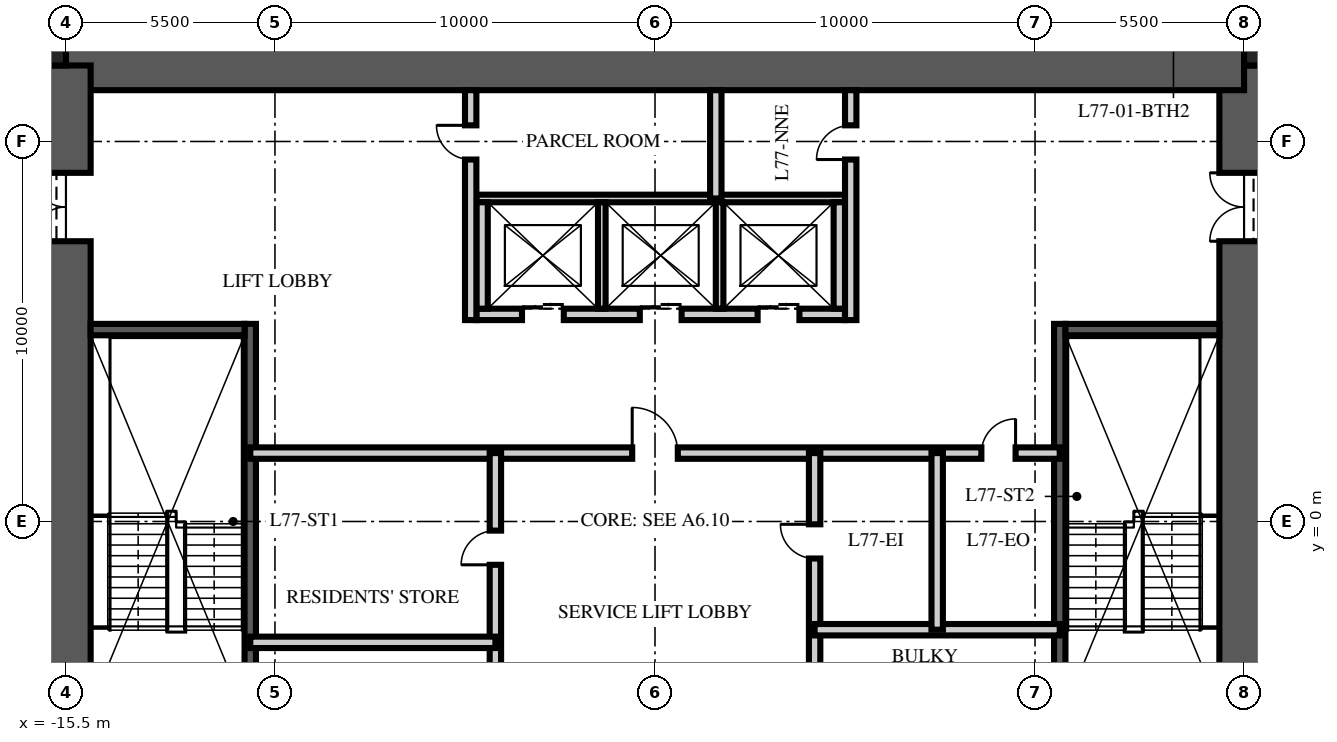
"""IFC4 building model, lengths in metres.
Left out: names, types, materials, properties, quantities, classifications, styles, units other than length and angle.
Written with IfcOpenShell. Run it as: python <this file> out.ifc"""

import sys

from ifc_helpers import new_model, si_unit, direction, frame, frame_2d, origin, origin_2d, place, context, subcontext, project, spatial, rectangle, extrude, element, fill, save


model = new_model("IFC4")
c1 = context("Model", 3, precision=1e-05, world=origin(), true_north=direction((0.0, 1.0)))
c2 = subcontext(c1, "Body", "Model", "MODEL_VIEW")
j1 = project(units=[si_unit("LENGTHUNIT", "METRE"), si_unit("PLANEANGLEUNIT", "RADIAN")], contexts=[c1])
p1 = place(None, origin())
s1 = spatial("IfcSite", under=j1, at=p1, CompositionType="ELEMENT")
p2 = place(p1, origin())
s2 = spatial("IfcBuilding", under=s1, at=p2, CompositionType="ELEMENT")
p3 = place(p2, frame((0.0, 0.0, 308.25)))
s3 = spatial("IfcBuildingStorey", under=s2, at=p3, CompositionType="ELEMENT", Elevation=308.25)
p4 = place(p3, frame((15.5, -12.0, -0.25), z_axis=(0.0, 0.0, 1.0), x_axis=(0.0, 1.0, 0.0)))
e1 = element("IfcWall", 1, at=p4, inside=s3, PredefinedType="SHEAR", context=c2, shape_type="SweptSolid", body=[
    extrude(rectangle(XDim=24.0, YDim=1.3, at=frame_2d((12.0, 0.0))), origin(), (0.0, 0.0, 1.0), 3.75),
])
p5 = place(p4, frame((3.125, 0.0, 0.25)))
e2 = element("IfcOpeningElement", 2, at=p5, cuts=e1, PredefinedType="OPENING", context=c2, shape_type="SweptSolid", body=[
    extrude(rectangle(XDim=1.2, YDim=2.1, at=frame_2d((0.6, 1.05))), frame((0.0, 0.66, 0.0), z_axis=(0.0, -1.0, 0.0), x_axis=(1.0, 0.0, 0.0)), (0.0, 0.0, 1.0), 1.32),
])
p6 = place(p4, frame((19.375, 0.0, 0.25)))
e3 = element("IfcOpeningElement", 3, at=p6, cuts=e1, PredefinedType="OPENING", context=c2, shape_type="SweptSolid", body=[
    extrude(rectangle(XDim=1.8, YDim=2.1, at=frame_2d((0.9, 1.05))), frame((0.0, 0.66, 0.0), z_axis=(0.0, -1.0, 0.0), x_axis=(1.0, 0.0, 0.0)), (0.0, 0.0, 1.0), 1.32),
])
p7 = place(p3, frame((-15.5, 12.0, -0.25), z_axis=(0.0, 0.0, 1.0), x_axis=(1.0, 0.0, 0.0)))
e4 = element("IfcWall", 4, at=p7, inside=s3, PredefinedType="SHEAR", context=c2, shape_type="SweptSolid", body=[
    extrude(rectangle(XDim=31.0, YDim=1.3, at=frame_2d((15.5, 0.0))), origin(), (0.0, 0.0, 1.0), 3.75),
])
p8 = place(p3, frame((-15.5, -12.0, -0.25), z_axis=(0.0, 0.0, 1.0), x_axis=(0.0, 1.0, 0.0)))
e5 = element("IfcWall", 5, at=p8, inside=s3, PredefinedType="SHEAR", context=c2, shape_type="SweptSolid", body=[
    extrude(rectangle(XDim=24.0, YDim=1.3, at=frame_2d((12.0, 0.0))), origin(), (0.0, 0.0, 1.0), 3.75),
])
p9 = place(p8, frame((3.125, 0.0, 0.25)))
e6 = element("IfcOpeningElement", 6, at=p9, cuts=e5, PredefinedType="OPENING", context=c2, shape_type="SweptSolid", body=[
    extrude(rectangle(XDim=1.2, YDim=2.1, at=frame_2d((0.6, 1.05))), frame((0.0, 0.66, 0.0), z_axis=(0.0, -1.0, 0.0), x_axis=(1.0, 0.0, 0.0)), (0.0, 0.0, 1.0), 1.32),
])
p10 = place(p8, frame((19.375, 0.0, 0.25)))
e7 = element("IfcOpeningElement", 7, at=p10, cuts=e5, PredefinedType="OPENING", context=c2, shape_type="SweptSolid", body=[
    extrude(rectangle(XDim=1.8, YDim=2.1, at=frame_2d((0.9, 1.05))), frame((0.0, 0.66, 0.0), z_axis=(0.0, -1.0, 0.0), x_axis=(1.0, 0.0, 0.0)), (0.0, 0.0, 1.0), 1.32),
])
for number, where, z_axis, x_axis in (
    (8, (15.825, 12.325, -0.25), (0.0, 0.0, 1.0), (1.0, 0.0, 0.0)),
    (9, (-15.825, 12.325, -0.25), (0.0, 0.0, 1.0), (1.0, 0.0, 0.0)),
):
    element("IfcColumn", number, at=place(p3, frame(where, z_axis=z_axis, x_axis=x_axis)), inside=s3, PredefinedType="COLUMN", context=c2, shape_type="SweptSolid", body=[
        extrude(rectangle(XDim=0.65, YDim=0.65, at=origin_2d()), origin(), (0.0, 0.0, 1.0), 3.75),
    ])
p11 = place(p3, frame((-10.65, -4.9, 0.0), z_axis=(0.0, 0.0, 1.0), x_axis=(0.0, 1.0, 0.0)))
e10 = element("IfcWall", 10, at=p11, inside=s3, PredefinedType="SOLIDWALL", context=c2, shape_type="SweptSolid", body=[
    extrude(rectangle(XDim=10.1, YDim=0.3, at=frame_2d((5.05, 0.0))), origin(), (0.0, 0.0, 1.0), 3.5),
])
p12 = place(p3, frame((-14.85, 5.05, 0.0), z_axis=(0.0, 0.0, 1.0), x_axis=(1.0, 0.0, 0.0)))
e11 = element("IfcWall", 11, at=p12, inside=s3, PredefinedType="SOLIDWALL", context=c2, shape_type="SweptSolid", body=[
    extrude(rectangle(XDim=4.05, YDim=0.3, at=frame_2d((2.025, 0.0))), origin(), (0.0, 0.0, 1.0), 3.5),
])
p13 = place(p3, frame((10.65, -4.9, 0.0), z_axis=(0.0, 0.0, 1.0), x_axis=(0.0, 1.0, 0.0)))
e12 = element("IfcWall", 12, at=p13, inside=s3, PredefinedType="SOLIDWALL", context=c2, shape_type="SweptSolid", body=[
    extrude(rectangle(XDim=10.1, YDim=0.3, at=frame_2d((5.05, 0.0))), origin(), (0.0, 0.0, 1.0), 3.5),
])
p14 = place(p3, frame((14.85, 5.05, 0.0), z_axis=(0.0, 0.0, 1.0), x_axis=(-1.0, 0.0, 0.0)))
e13 = element("IfcWall", 13, at=p14, inside=s3, PredefinedType="SOLIDWALL", context=c2, shape_type="SweptSolid", body=[
    extrude(rectangle(XDim=4.05, YDim=0.3, at=frame_2d((2.025, 0.0))), origin(), (0.0, 0.0, 1.0), 3.5),
])
p15 = place(p3, frame((-4.7, 5.45, 0.0), z_axis=(0.0, 0.0, 1.0), x_axis=(1.0, 0.0, 0.0)))
e14 = element("IfcWall", 14, at=p15, inside=s3, PredefinedType="PARTITIONING", context=c2, shape_type="SweptSolid", body=[
    extrude(rectangle(XDim=9.7, YDim=0.3, at=frame_2d((4.85, 0.0))), origin(), (0.0, 0.0, 1.0), 3.5),
])
p16 = place(p15, frame((1.2, 0.0, 0.0)))
e15 = element("IfcOpeningElement", 15, at=p16, cuts=e14, PredefinedType="OPENING", context=c2, shape_type="SweptSolid", body=[
    extrude(rectangle(XDim=1.1, YDim=2.1, at=frame_2d((0.55, 1.05))), frame((0.0, 0.16, 0.0), z_axis=(0.0, -1.0, 0.0), x_axis=(1.0, 0.0, 0.0)), (0.0, 0.0, 1.0), 0.32),
])
p17 = place(p15, frame((4.3, 0.0, 0.0)))
e16 = element("IfcOpeningElement", 16, at=p17, cuts=e14, PredefinedType="OPENING", context=c2, shape_type="SweptSolid", body=[
    extrude(rectangle(XDim=1.1, YDim=2.1, at=frame_2d((0.55, 1.05))), frame((0.0, 0.16, 0.0), z_axis=(0.0, -1.0, 0.0), x_axis=(1.0, 0.0, 0.0)), (0.0, 0.0, 1.0), 0.32),
])
p18 = place(p15, frame((7.4, 0.0, 0.0)))
e17 = element("IfcOpeningElement", 17, at=p18, cuts=e14, PredefinedType="OPENING", context=c2, shape_type="SweptSolid", body=[
    extrude(rectangle(XDim=1.1, YDim=2.1, at=frame_2d((0.55, 1.05))), frame((0.0, 0.16, 0.0), z_axis=(0.0, -1.0, 0.0), x_axis=(1.0, 0.0, 0.0)), (0.0, 0.0, 1.0), 0.32),
])
p19 = place(p3, frame((-4.7, 8.5, 0.0), z_axis=(0.0, 0.0, 1.0), x_axis=(1.0, 0.0, 0.0)))
e18 = element("IfcWall", 18, at=p19, inside=s3, PredefinedType="PARTITIONING", context=c2, shape_type="SweptSolid", body=[
    extrude(rectangle(XDim=9.7, YDim=0.2, at=frame_2d((4.85, 0.0))), origin(), (0.0, 0.0, 1.0), 3.5),
])
for number, where, z_axis, x_axis in (
    (19, (-4.55, 5.6, 0.0), (0.0, 0.0, 1.0), (0.0, 1.0, 0.0)),
    (20, (4.85, 5.6, 0.0), (0.0, 0.0, 1.0), (0.0, 1.0, 0.0)),
):
    element("IfcWall", number, at=place(p3, frame(where, z_axis=z_axis, x_axis=x_axis)), inside=s3, PredefinedType="PARTITIONING", context=c2, shape_type="SweptSolid", body=[
        extrude(rectangle(XDim=2.8, YDim=0.3, at=frame_2d((1.4, 0.0))), origin(), (0.0, 0.0, 1.0), 3.5),
    ])
for number, where, z_axis, x_axis in (
    (21, (-1.4, 5.6, 0.0), (0.0, 0.0, 1.0), (0.0, 1.0, 0.0)),
    (22, (1.7, 5.6, 0.0), (0.0, 0.0, 1.0), (0.0, 1.0, 0.0)),
):
    element("IfcWall", number, at=place(p3, frame(where, z_axis=z_axis, x_axis=x_axis)), inside=s3, PredefinedType="PARTITIONING", context=c2, shape_type="SweptSolid", body=[
        extrude(rectangle(XDim=2.8, YDim=0.2, at=frame_2d((1.4, 0.0))), origin(), (0.0, 0.0, 1.0), 3.5),
    ])
p20 = place(p3, frame((-10.65, 1.8, 0.0), z_axis=(0.0, 0.0, 1.0), x_axis=(1.0, 0.0, 0.0)))
e23 = element("IfcWall", 23, at=p20, inside=s3, PredefinedType="PARTITIONING", context=c2, shape_type="SweptSolid", body=[
    extrude(rectangle(XDim=21.3, YDim=0.3, at=frame_2d((10.65, 0.0))), origin(), (0.0, 0.0, 1.0), 3.5),
])
p21 = place(p20, frame((10.05, 0.0, 0.0)))
e24 = element("IfcOpeningElement", 24, at=p21, cuts=e23, PredefinedType="OPENING", context=c2, shape_type="SweptSolid", body=[
    extrude(rectangle(XDim=1.2, YDim=2.1, at=frame_2d((0.6, 1.05))), frame((0.0, 0.16, 0.0), z_axis=(0.0, -1.0, 0.0), x_axis=(1.0, 0.0, 0.0)), (0.0, 0.0, 1.0), 0.32),
])
p22 = place(p20, frame((19.238, 0.0, 0.0)))
e25 = element("IfcOpeningElement", 25, at=p22, cuts=e23, PredefinedType="OPENING", context=c2, shape_type="SweptSolid", body=[
    extrude(rectangle(XDim=0.9, YDim=2.1, at=frame_2d((0.45, 1.05))), frame((0.0, 0.16, 0.0), z_axis=(0.0, -1.0, 0.0), x_axis=(1.0, 0.0, 0.0)), (0.0, 0.0, 1.0), 0.32),
])
p23 = place(p3, frame((-4.2, -6.65, 0.0), z_axis=(0.0, 0.0, 1.0), x_axis=(0.0, 1.0, 0.0)))
e26 = element("IfcWall", 26, at=p23, inside=s3, PredefinedType="PARTITIONING", context=c2, shape_type="SweptSolid", body=[
    extrude(rectangle(XDim=8.45, YDim=0.3, at=frame_2d((4.225, 0.0))), origin(), (0.0, 0.0, 1.0), 3.5),
])
p24 = place(p23, frame((1.285, 0.0, 0.0)))
e27 = element("IfcOpeningElement", 27, at=p24, cuts=e26, PredefinedType="OPENING", context=c2, shape_type="SweptSolid", body=[
    extrude(rectangle(XDim=0.9, YDim=2.1, at=frame_2d((0.45, 1.05))), frame((0.0, 0.16, 0.0), z_axis=(0.0, -1.0, 0.0), x_axis=(1.0, 0.0, 0.0)), (0.0, 0.0, 1.0), 0.32),
])
p25 = place(p23, frame((5.51, 0.0, 0.0)))
e28 = element("IfcOpeningElement", 28, at=p25, cuts=e26, PredefinedType="OPENING", context=c2, shape_type="SweptSolid", body=[
    extrude(rectangle(XDim=0.9, YDim=2.1, at=frame_2d((0.45, 1.05))), frame((0.0, 0.16, 0.0), z_axis=(0.0, -1.0, 0.0), x_axis=(1.0, 0.0, 0.0)), (0.0, 0.0, 1.0), 0.32),
])
p26 = place(p3, frame((4.2, -6.65, 0.0), z_axis=(0.0, 0.0, 1.0), x_axis=(0.0, 1.0, 0.0)))
e29 = element("IfcWall", 29, at=p26, inside=s3, PredefinedType="PARTITIONING", context=c2, shape_type="SweptSolid", body=[
    extrude(rectangle(XDim=8.45, YDim=0.3, at=frame_2d((4.225, 0.0))), origin(), (0.0, 0.0, 1.0), 3.5),
])
p27 = place(p26, frame((1.451, 0.0, 0.0)))
e30 = element("IfcOpeningElement", 30, at=p27, cuts=e29, PredefinedType="OPENING", context=c2, shape_type="SweptSolid", body=[
    extrude(rectangle(XDim=0.9, YDim=2.1, at=frame_2d((0.45, 1.05))), frame((0.0, 0.16, 0.0), z_axis=(0.0, -1.0, 0.0), x_axis=(1.0, 0.0, 0.0)), (0.0, 0.0, 1.0), 0.32),
])
p28 = place(p26, frame((5.676, 0.0, 0.0)))
e31 = element("IfcOpeningElement", 31, at=p28, cuts=e29, PredefinedType="OPENING", context=c2, shape_type="SweptSolid", body=[
    extrude(rectangle(XDim=0.9, YDim=2.1, at=frame_2d((0.45, 1.05))), frame((0.0, 0.16, 0.0), z_axis=(0.0, -1.0, 0.0), x_axis=(1.0, 0.0, 0.0)), (0.0, 0.0, 1.0), 0.32),
])
for number, where, z_axis, x_axis in (
    (32, (-10.65, -3.18, 0.0), (0.0, 0.0, 1.0), (1.0, 0.0, 0.0)),
    (33, (10.65, -2.848, 0.0), (0.0, 0.0, 1.0), (-1.0, 0.0, 0.0)),
):
    element("IfcWall", number, at=place(p3, frame(where, z_axis=z_axis, x_axis=x_axis)), inside=s3, PredefinedType="PARTITIONING", context=c2, shape_type="SweptSolid", body=[
        extrude(rectangle(XDim=6.45, YDim=0.3, at=frame_2d((3.225, 0.0))), origin(), (0.0, 0.0, 1.0), 3.5),
    ])
p29 = place(p3, frame((7.425, -2.848, 0.0), z_axis=(0.0, 0.0, 1.0), x_axis=(0.0, 1.0, 0.0)))
e34 = element("IfcWall", 34, at=p29, inside=s3, PredefinedType="PARTITIONING", context=c2, shape_type="SweptSolid", body=[
    extrude(rectangle(XDim=4.648, YDim=0.3, at=frame_2d((2.324, 0.0))), origin(), (0.0, 0.0, 1.0), 3.5),
])
p30 = place(p3, frame((-4.85, 5.3, 0.0), z_axis=(0.0, 0.0, 1.0), x_axis=(0.0, 1.0, 0.0)))
e35 = element("IfcWall", 35, at=p30, inside=s3, PredefinedType="PARTITIONING", context=c2, shape_type="SweptSolid", body=[
    extrude(rectangle(XDim=6.05, YDim=0.3, at=frame_2d((3.025, 0.0))), origin(), (0.0, 0.0, 1.0), 3.5),
])
p31 = place(p30, frame((4.225, 0.0, 0.0)))
e36 = element("IfcOpeningElement", 36, at=p31, cuts=e35, PredefinedType="OPENING", context=c2, shape_type="SweptSolid", body=[
    extrude(rectangle(XDim=0.9, YDim=2.1, at=frame_2d((0.45, 1.05))), frame((0.0, 0.16, 0.0), z_axis=(0.0, -1.0, 0.0), x_axis=(1.0, 0.0, 0.0)), (0.0, 0.0, 1.0), 0.32),
])
p32 = place(p3, frame((5.15, 5.3, 0.0), z_axis=(0.0, 0.0, 1.0), x_axis=(0.0, 1.0, 0.0)))
e37 = element("IfcWall", 37, at=p32, inside=s3, PredefinedType="PARTITIONING", context=c2, shape_type="SweptSolid", body=[
    extrude(rectangle(XDim=6.05, YDim=0.3, at=frame_2d((3.025, 0.0))), origin(), (0.0, 0.0, 1.0), 3.5),
])
p33 = place(p32, frame((4.225, 0.0, 0.0)))
e38 = element("IfcOpeningElement", 38, at=p33, cuts=e37, PredefinedType="OPENING", context=c2, shape_type="SweptSolid", body=[
    extrude(rectangle(XDim=0.9, YDim=2.1, at=frame_2d((0.45, 1.05))), frame((0.0, 0.16, 0.0), z_axis=(0.0, -1.0, 0.0), x_axis=(1.0, 0.0, 0.0)), (0.0, 0.0, 1.0), 0.32),
])
p34 = place(p3, frame((1.6, 8.5, 0.0), z_axis=(0.0, 0.0, 1.0), x_axis=(0.0, 1.0, 0.0)))
e39 = element("IfcWall", 39, at=p34, inside=s3, PredefinedType="PARTITIONING", context=c2, shape_type="SweptSolid", body=[
    extrude(rectangle(XDim=2.85, YDim=0.3, at=frame_2d((1.425, 0.0))), origin(), (0.0, 0.0, 1.0), 3.5),
])
p35 = place(p10, origin())
e40 = element("IfcDoor", 40, at=p35, inside=s3, OperationType="DOUBLE_DOOR_SINGLE_SWING", PredefinedType="DOOR", context=c2, shape_type="SweptSolid", body=[
    extrude(rectangle(XDim=1.8, YDim=2.1, at=frame_2d((0.9, 1.05))), frame((0.0, 0.025, 0.0), z_axis=(0.0, -1.0, 0.0), x_axis=(1.0, 0.0, 0.0)), (0.0, 0.0, 1.0), 0.05),
])
fill(e7, e40)
p36 = place(p6, origin())
e41 = element("IfcDoor", 41, at=p36, inside=s3, OperationType="DOUBLE_DOOR_SINGLE_SWING", PredefinedType="DOOR", context=c2, shape_type="SweptSolid", body=[
    extrude(rectangle(XDim=1.8, YDim=2.1, at=frame_2d((0.9, 1.05))), frame((0.0, 0.025, 0.0), z_axis=(0.0, -1.0, 0.0), x_axis=(1.0, 0.0, 0.0)), (0.0, 0.0, 1.0), 0.05),
])
fill(e3, e41)
p37 = place(p16, origin())
e42 = element("IfcDoor", 42, at=p37, inside=s3, OperationType="DOUBLE_DOOR_SLIDING", PredefinedType="DOOR", context=c2, shape_type="SweptSolid", body=[
    extrude(rectangle(XDim=1.1, YDim=2.1, at=frame_2d((0.55, 1.05))), frame((0.0, 0.025, 0.0), z_axis=(0.0, -1.0, 0.0), x_axis=(1.0, 0.0, 0.0)), (0.0, 0.0, 1.0), 0.05),
])
fill(e15, e42)
p38 = place(p17, origin())
e43 = element("IfcDoor", 43, at=p38, inside=s3, OperationType="DOUBLE_DOOR_SLIDING", PredefinedType="DOOR", context=c2, shape_type="SweptSolid", body=[
    extrude(rectangle(XDim=1.1, YDim=2.1, at=frame_2d((0.55, 1.05))), frame((0.0, 0.025, 0.0), z_axis=(0.0, -1.0, 0.0), x_axis=(1.0, 0.0, 0.0)), (0.0, 0.0, 1.0), 0.05),
])
fill(e16, e43)
p39 = place(p18, origin())
e44 = element("IfcDoor", 44, at=p39, inside=s3, OperationType="DOUBLE_DOOR_SLIDING", PredefinedType="DOOR", context=c2, shape_type="SweptSolid", body=[
    extrude(rectangle(XDim=1.1, YDim=2.1, at=frame_2d((0.55, 1.05))), frame((0.0, 0.025, 0.0), z_axis=(0.0, -1.0, 0.0), x_axis=(1.0, 0.0, 0.0)), (0.0, 0.0, 1.0), 0.05),
])
fill(e17, e44)
p40 = place(p21, origin())
e45 = element("IfcDoor", 45, at=p40, inside=s3, OperationType="SINGLE_SWING_LEFT", PredefinedType="DOOR", context=c2, shape_type="SweptSolid", body=[
    extrude(rectangle(XDim=1.2, YDim=2.1, at=frame_2d((0.6, 1.05))), frame((0.0, 0.025, 0.0), z_axis=(0.0, -1.0, 0.0), x_axis=(1.0, 0.0, 0.0)), (0.0, 0.0, 1.0), 0.05),
])
fill(e24, e45)
p41 = place(p25, origin())
e46 = element("IfcDoor", 46, at=p41, inside=s3, OperationType="SINGLE_SWING_LEFT", PredefinedType="DOOR", context=c2, shape_type="SweptSolid", body=[
    extrude(rectangle(XDim=0.9, YDim=2.1, at=frame_2d((0.45, 1.05))), frame((0.0, 0.025, 0.0), z_axis=(0.0, -1.0, 0.0), x_axis=(1.0, 0.0, 0.0)), (0.0, 0.0, 1.0), 0.05),
])
fill(e28, e46)
p42 = place(p28, origin())
e47 = element("IfcDoor", 47, at=p42, inside=s3, OperationType="SINGLE_SWING_RIGHT", PredefinedType="DOOR", context=c2, shape_type="SweptSolid", body=[
    extrude(rectangle(XDim=0.9, YDim=2.1, at=frame_2d((0.45, 1.05))), frame((0.0, 0.025, 0.0), z_axis=(0.0, -1.0, 0.0), x_axis=(1.0, 0.0, 0.0)), (0.0, 0.0, 1.0), 0.05),
])
fill(e31, e47)
p43 = place(p22, origin())
e48 = element("IfcDoor", 48, at=p43, inside=s3, OperationType="SINGLE_SWING_RIGHT", PredefinedType="DOOR", context=c2, shape_type="SweptSolid", body=[
    extrude(rectangle(XDim=0.9, YDim=2.1, at=frame_2d((0.45, 1.05))), frame((0.0, 0.025, 0.0), z_axis=(0.0, -1.0, 0.0), x_axis=(1.0, 0.0, 0.0)), (0.0, 0.0, 1.0), 0.05),
])
fill(e25, e48)
p44 = place(p31, origin())
e49 = element("IfcDoor", 49, at=p44, inside=s3, OperationType="SINGLE_SWING_RIGHT", PredefinedType="DOOR", context=c2, shape_type="SweptSolid", body=[
    extrude(rectangle(XDim=0.9, YDim=2.1, at=frame_2d((0.45, 1.05))), frame((0.0, 0.025, 0.0), z_axis=(0.0, -1.0, 0.0), x_axis=(1.0, 0.0, 0.0)), (0.0, 0.0, 1.0), 0.05),
])
fill(e36, e49)
p45 = place(p33, origin())
e50 = element("IfcDoor", 50, at=p45, inside=s3, OperationType="SINGLE_SWING_LEFT", PredefinedType="DOOR", context=c2, shape_type="SweptSolid", body=[
    extrude(rectangle(XDim=0.9, YDim=2.1, at=frame_2d((0.45, 1.05))), frame((0.0, 0.025, 0.0), z_axis=(0.0, -1.0, 0.0), x_axis=(1.0, 0.0, 0.0)), (0.0, 0.0, 1.0), 0.05),
])
fill(e38, e50)
save(model, sys.argv[1])
